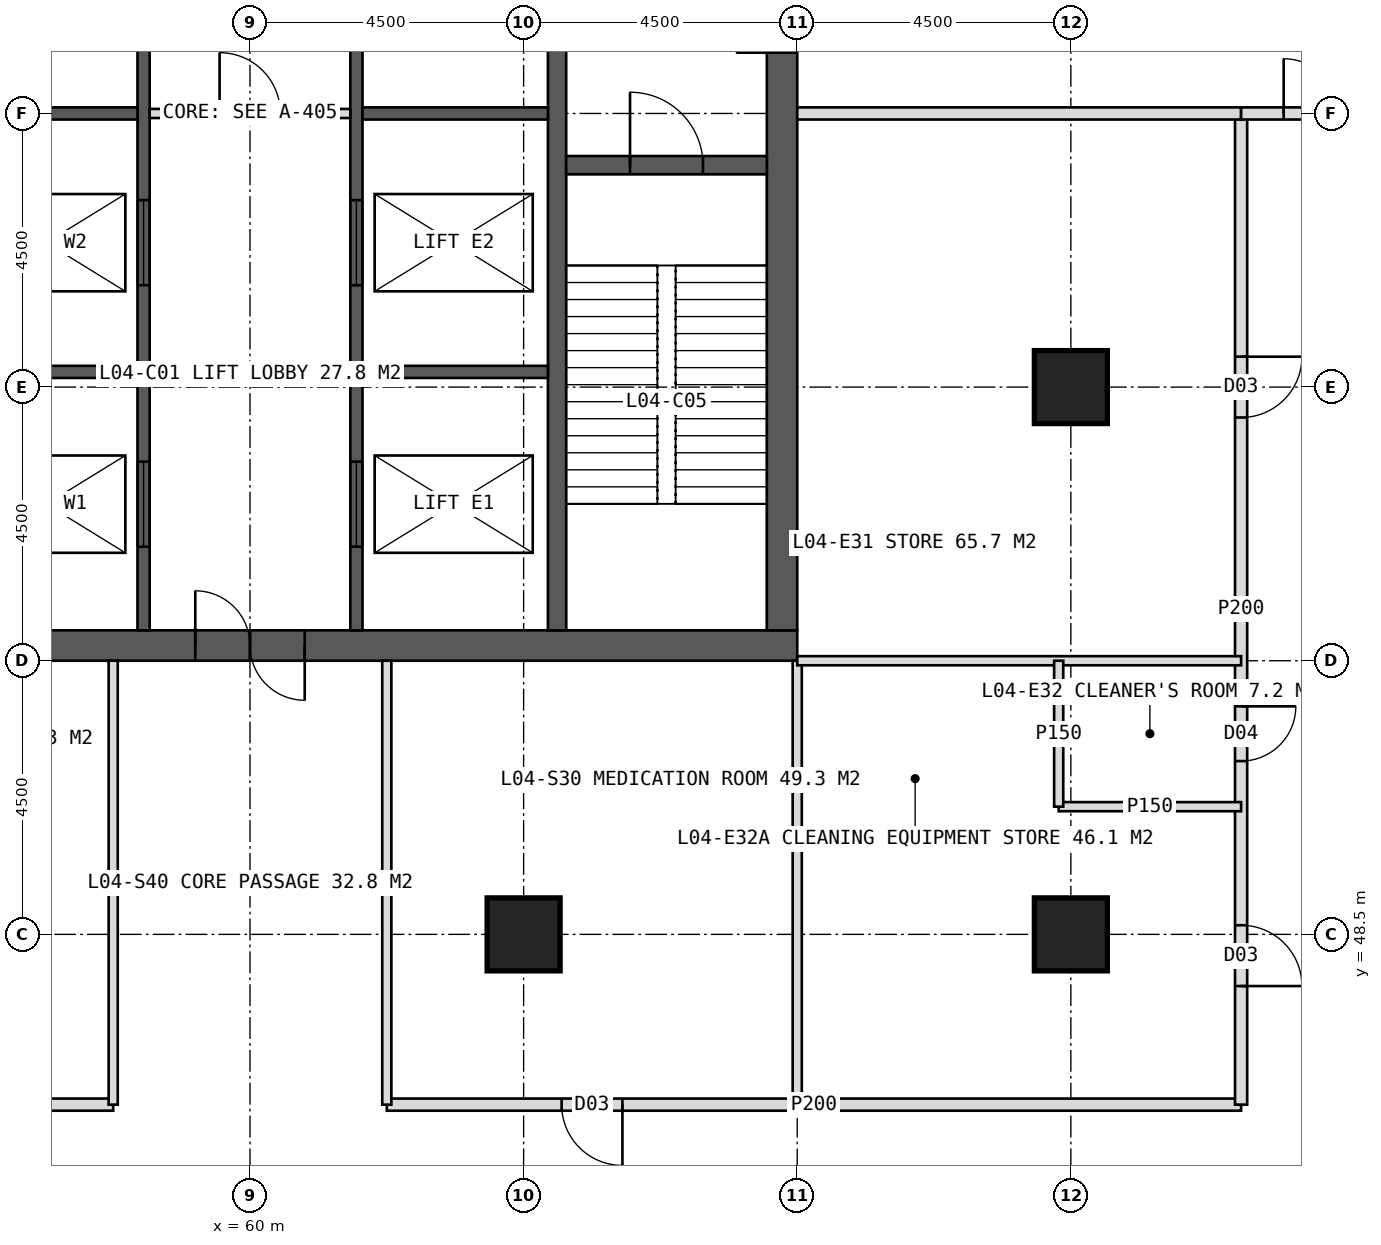
"""IFC4 building model, lengths in metres.
Left out: names, types, materials, properties, quantities, classifications, styles, units other than length and angle.
Written with IfcOpenShell. Run it as: python <this file> out.ifc"""

import sys

from ifc_helpers import new_model, si_unit, direction, frame, frame_2d, origin, origin_2d, place, context, subcontext, project, spatial, rectangle, hollow_rectangle, extrude, element, fill, save


model = new_model("IFC4")
c1 = context("Model", 3, precision=1e-05, world=origin(), true_north=direction((0.0, 1.0)))
c2 = subcontext(c1, "Body", "Model", "MODEL_VIEW")
j1 = project(units=[si_unit("LENGTHUNIT", "METRE"), si_unit("PLANEANGLEUNIT", "RADIAN")], contexts=[c1])
p1 = place(None, origin())
s1 = spatial("IfcSite", under=j1, at=p1, CompositionType="ELEMENT")
p2 = place(p1, origin())
s2 = spatial("IfcBuilding", under=s1, at=p2, CompositionType="ELEMENT")
p3 = place(p2, frame((0.0, 0.0, 21.0)))
s3 = spatial("IfcBuildingStorey", under=s2, at=p3, CompositionType="ELEMENT", Elevation=21.0)
p4 = place(p3, frame((51.0, 53.25, 0.0), z_axis=(0.0, 0.0, 1.0), x_axis=(1.0, 0.0, 0.0)))
e1 = element("IfcWall", 1, at=p4, inside=s3, PredefinedType="SHEAR", context=c2, shape_type="SweptSolid", body=[
    extrude(rectangle(XDim=18.0, YDim=0.5, at=frame_2d((9.0, 0.0))), origin(), (0.0, 0.0, 1.0), 5.0),
])
p5 = place(p4, frame((8.1, 0.0, 0.0)))
e2 = element("IfcOpeningElement", 2, at=p5, cuts=e1, PredefinedType="OPENING", context=c2, shape_type="SweptSolid", body=[
    extrude(rectangle(XDim=1.8, YDim=2.2, at=frame_2d((0.9, 1.1))), frame((0.0, 0.26, 0.0), z_axis=(0.0, -1.0, 0.0), x_axis=(1.0, 0.0, 0.0)), (0.0, 0.0, 1.0), 0.52),
])
p6 = place(p3, frame((68.75, 53.5, 0.0), z_axis=(0.0, 0.0, 1.0), x_axis=(0.0, 1.0, 0.0)))
e3 = element("IfcWall", 3, at=p6, inside=s3, PredefinedType="SHEAR", context=c2, shape_type="SweptSolid", body=[
    extrude(rectangle(XDim=17.0, YDim=0.5, at=frame_2d((8.5, 0.0))), origin(), (0.0, 0.0, 1.0), 5.0),
])
p7 = place(p6, frame((9.5, 0.0, 0.0)))
e4 = element("IfcOpeningElement", 4, at=p7, cuts=e3, PredefinedType="OPENING", context=c2, shape_type="SweptSolid", body=[
    extrude(rectangle(XDim=1.5, YDim=2.2, at=frame_2d((0.75, 1.1))), frame((0.0, 0.26, 0.0), z_axis=(0.0, -1.0, 0.0), x_axis=(1.0, 0.0, 0.0)), (0.0, 0.0, 1.0), 0.52),
])
p8 = place(p3, frame((65.05, 53.5, 0.0), z_axis=(0.0, 0.0, 1.0), x_axis=(0.0, 1.0, 0.0)))
e5 = element("IfcWall", 5, at=p8, inside=s3, PredefinedType="SHEAR", context=c2, shape_type="SweptSolid", body=[
    extrude(rectangle(XDim=17.0, YDim=0.3, at=frame_2d((8.5, 0.0))), origin(), (0.0, 0.0, 1.0), 5.0),
])
p9 = place(p3, frame((58.25, 53.5, 0.0), z_axis=(0.0, 0.0, 1.0), x_axis=(0.0, 1.0, 0.0)))
e6 = element("IfcWall", 6, at=p9, inside=s3, PredefinedType="SHEAR", context=c2, shape_type="SweptSolid", body=[
    extrude(rectangle(XDim=17.0, YDim=0.2, at=frame_2d((8.5, 0.0))), origin(), (0.0, 0.0, 1.0), 5.0),
])
p10 = place(p9, frame((1.375, 0.0, 0.0)))
e7 = element("IfcOpeningElement", 7, at=p10, cuts=e6, PredefinedType="OPENING", context=c2, shape_type="SweptSolid", body=[
    extrude(rectangle(XDim=1.4, YDim=2.2, at=frame_2d((0.7, 1.1))), frame((0.0, 0.11, 0.0), z_axis=(0.0, -1.0, 0.0), x_axis=(1.0, 0.0, 0.0)), (0.0, 0.0, 1.0), 0.22),
])
p11 = place(p9, frame((5.675, 0.0, 0.0)))
e8 = element("IfcOpeningElement", 8, at=p11, cuts=e6, PredefinedType="OPENING", context=c2, shape_type="SweptSolid", body=[
    extrude(rectangle(XDim=1.4, YDim=2.2, at=frame_2d((0.7, 1.1))), frame((0.0, 0.11, 0.0), z_axis=(0.0, -1.0, 0.0), x_axis=(1.0, 0.0, 0.0)), (0.0, 0.0, 1.0), 0.22),
])
p12 = place(p3, frame((61.75, 53.5, 0.0), z_axis=(0.0, 0.0, 1.0), x_axis=(0.0, 1.0, 0.0)))
e9 = element("IfcWall", 9, at=p12, inside=s3, PredefinedType="SHEAR", context=c2, shape_type="SweptSolid", body=[
    extrude(rectangle(XDim=17.0, YDim=0.2, at=frame_2d((8.5, 0.0))), origin(), (0.0, 0.0, 1.0), 5.0),
])
p13 = place(p12, frame((1.375, 0.0, 0.0)))
e10 = element("IfcOpeningElement", 10, at=p13, cuts=e9, PredefinedType="OPENING", context=c2, shape_type="SweptSolid", body=[
    extrude(rectangle(XDim=1.4, YDim=2.2, at=frame_2d((0.7, 1.1))), frame((0.0, 0.11, 0.0), z_axis=(0.0, -1.0, 0.0), x_axis=(1.0, 0.0, 0.0)), (0.0, 0.0, 1.0), 0.22),
])
p14 = place(p12, frame((5.675, 0.0, 0.0)))
e11 = element("IfcOpeningElement", 11, at=p14, cuts=e9, PredefinedType="OPENING", context=c2, shape_type="SweptSolid", body=[
    extrude(rectangle(XDim=1.4, YDim=2.2, at=frame_2d((0.7, 1.1))), frame((0.0, 0.11, 0.0), z_axis=(0.0, -1.0, 0.0), x_axis=(1.0, 0.0, 0.0)), (0.0, 0.0, 1.0), 0.22),
])
for number, where, z_axis, x_axis in (
    (12, (55.1, 57.75, 0.0), (0.0, 0.0, 1.0), (1.0, 0.0, 0.0)),
    (13, (61.85, 57.75, 0.0), (0.0, 0.0, 1.0), (1.0, 0.0, 0.0)),
    (14, (55.1, 62.0, 0.0), (0.0, 0.0, 1.0), (1.0, 0.0, 0.0)),
    (15, (61.85, 62.0, 0.0), (0.0, 0.0, 1.0), (1.0, 0.0, 0.0)),
):
    element("IfcWall", number, at=place(p3, frame(where, z_axis=z_axis, x_axis=x_axis)), inside=s3, PredefinedType="SHEAR", context=c2, shape_type="SweptSolid", body=[
        extrude(rectangle(XDim=3.05, YDim=0.2, at=frame_2d((1.525, 0.0))), origin(), (0.0, 0.0, 1.0), 5.0),
    ])
p15 = place(p3, frame((65.2, 61.15, 0.0), z_axis=(0.0, 0.0, 1.0), x_axis=(1.0, 0.0, 0.0)))
e16 = element("IfcWall", 16, at=p15, inside=s3, PredefinedType="SHEAR", context=c2, shape_type="SweptSolid", body=[
    extrude(rectangle(XDim=3.3, YDim=0.3, at=frame_2d((1.65, 0.0))), origin(), (0.0, 0.0, 1.0), 5.0),
])
p16 = place(p15, frame((1.05, 0.0, 0.0)))
e17 = element("IfcOpeningElement", 17, at=p16, cuts=e16, PredefinedType="OPENING", context=c2, shape_type="SweptSolid", body=[
    extrude(rectangle(XDim=1.2, YDim=2.1, at=frame_2d((0.6, 1.05))), frame((0.0, 0.16, 0.0), z_axis=(0.0, -1.0, 0.0), x_axis=(1.0, 0.0, 0.0)), (0.0, 0.0, 1.0), 0.32),
])
for number, where, z_axis, x_axis in (
    (18, (73.5, 48.5, 0.0), (0.0, 0.0, 1.0), (1.0, 0.0, 0.0)),
    (19, (64.5, 48.5, 0.0), (0.0, 0.0, 1.0), (1.0, 0.0, 0.0)),
    (20, (73.5, 57.5, 0.0), (0.0, 0.0, 1.0), (1.0, 0.0, 0.0)),
):
    element("IfcColumn", number, at=place(p3, frame(where, z_axis=z_axis, x_axis=x_axis)), inside=s3, PredefinedType="COLUMN", context=c2, shape_type="SweptSolid", body=[
        extrude(hollow_rectangle(XDim=1.2, YDim=1.2, WallThickness=0.1, at=origin_2d()), origin(), (0.0, 0.0, 1.0), 5.0),
    ])
p17 = place(p3, frame((76.3, 45.7, 0.0), z_axis=(0.0, 0.0, 1.0), x_axis=(-1.0, 0.0, 0.0)))
e21 = element("IfcWall", 21, at=p17, inside=s3, PredefinedType="PARTITIONING", context=c2, shape_type="SweptSolid", body=[
    extrude(rectangle(XDim=14.05, YDim=0.2, at=frame_2d((7.025, 0.0))), origin(), (0.0, 0.0, 1.0), 4.7),
])
p18 = place(p17, frame((10.175, 0.0, 0.0)))
e22 = element("IfcOpeningElement", 22, at=p18, cuts=e21, PredefinedType="OPENING", context=c2, shape_type="SweptSolid", body=[
    extrude(rectangle(XDim=1.0, YDim=2.1, at=frame_2d((0.5, 1.05))), frame((0.0, 0.11, 0.0), z_axis=(0.0, -1.0, 0.0), x_axis=(1.0, 0.0, 0.0)), (0.0, 0.0, 1.0), 0.22),
])
p19 = place(p3, frame((57.75, 45.7, 0.0), z_axis=(0.0, 0.0, 1.0), x_axis=(-1.0, 0.0, 0.0)))
e23 = element("IfcWall", 23, at=p19, inside=s3, PredefinedType="PARTITIONING", context=c2, shape_type="SweptSolid", body=[
    extrude(rectangle(XDim=14.05, YDim=0.2, at=frame_2d((7.025, 0.0))), origin(), (0.0, 0.0, 1.0), 4.7),
])
p20 = place(p19, frame((9.9, 0.0, 0.0)))
e24 = element("IfcOpeningElement", 24, at=p20, cuts=e23, PredefinedType="OPENING", context=c2, shape_type="SweptSolid", body=[
    extrude(rectangle(XDim=1.0, YDim=2.1, at=frame_2d((0.5, 1.05))), frame((0.0, 0.11, 0.0), z_axis=(0.0, -1.0, 0.0), x_axis=(1.0, 0.0, 0.0)), (0.0, 0.0, 1.0), 0.22),
])
p21 = place(p19, frame((4.9, 0.0, 0.0)))
e25 = element("IfcOpeningElement", 25, at=p21, cuts=e23, PredefinedType="OPENING", context=c2, shape_type="SweptSolid", body=[
    extrude(rectangle(XDim=0.9, YDim=2.1, at=frame_2d((0.45, 1.05))), frame((0.0, 0.11, 0.0), z_axis=(0.0, -1.0, 0.0), x_axis=(1.0, 0.0, 0.0)), (0.0, 0.0, 1.0), 0.22),
])
p22 = place(p19, frame((1.475, 0.0, 0.0)))
e26 = element("IfcOpeningElement", 26, at=p22, cuts=e23, PredefinedType="OPENING", context=c2, shape_type="SweptSolid", body=[
    extrude(rectangle(XDim=1.0, YDim=2.1, at=frame_2d((0.5, 1.05))), frame((0.0, 0.11, 0.0), z_axis=(0.0, -1.0, 0.0), x_axis=(1.0, 0.0, 0.0)), (0.0, 0.0, 1.0), 0.22),
])
for number, where, z_axis, x_axis in (
    (27, (69.0, 53.0, 0.0), (0.0, 0.0, 1.0), (0.0, -1.0, 0.0)),
    (28, (62.25, 53.0, 0.0), (0.0, 0.0, 1.0), (0.0, -1.0, 0.0)),
    (29, (57.75, 53.0, 0.0), (0.0, 0.0, 1.0), (0.0, -1.0, 0.0)),
):
    element("IfcWall", number, at=place(p3, frame(where, z_axis=z_axis, x_axis=x_axis)), inside=s3, PredefinedType="PARTITIONING", context=c2, shape_type="SweptSolid", body=[
        extrude(rectangle(XDim=7.3, YDim=0.15, at=frame_2d((3.65, 0.0))), origin(), (0.0, 0.0, 1.0), 4.7),
    ])
p23 = place(p3, frame((76.3, 62.0, 0.0), z_axis=(0.0, 0.0, 1.0), x_axis=(0.0, -1.0, 0.0)))
e30 = element("IfcWall", 30, at=p23, inside=s3, PredefinedType="PARTITIONING", context=c2, shape_type="SweptSolid", body=[
    extrude(rectangle(XDim=16.3, YDim=0.2, at=frame_2d((8.15, 0.0))), origin(), (0.0, 0.0, 1.0), 4.7),
])
p24 = place(p23, frame((4.0, 0.0, 0.0)))
e31 = element("IfcOpeningElement", 31, at=p24, cuts=e30, PredefinedType="OPENING", context=c2, shape_type="SweptSolid", body=[
    extrude(rectangle(XDim=1.0, YDim=2.1, at=frame_2d((0.5, 1.05))), frame((0.0, 0.11, 0.0), z_axis=(0.0, -1.0, 0.0), x_axis=(1.0, 0.0, 0.0)), (0.0, 0.0, 1.0), 0.22),
])
p25 = place(p23, frame((9.75, 0.0, 0.0)))
e32 = element("IfcOpeningElement", 32, at=p25, cuts=e30, PredefinedType="OPENING", context=c2, shape_type="SweptSolid", body=[
    extrude(rectangle(XDim=0.9, YDim=2.1, at=frame_2d((0.45, 1.05))), frame((0.0, 0.11, 0.0), z_axis=(0.0, -1.0, 0.0), x_axis=(1.0, 0.0, 0.0)), (0.0, 0.0, 1.0), 0.22),
])
p26 = place(p23, frame((13.35, 0.0, 0.0)))
e33 = element("IfcOpeningElement", 33, at=p26, cuts=e30, PredefinedType="OPENING", context=c2, shape_type="SweptSolid", body=[
    extrude(rectangle(XDim=1.0, YDim=2.1, at=frame_2d((0.5, 1.05))), frame((0.0, 0.11, 0.0), z_axis=(0.0, -1.0, 0.0), x_axis=(1.0, 0.0, 0.0)), (0.0, 0.0, 1.0), 0.22),
])
p27 = place(p3, frame((69.0, 62.0, 0.0), z_axis=(0.0, 0.0, 1.0), x_axis=(1.0, 0.0, 0.0)))
e34 = element("IfcWall", 34, at=p27, inside=s3, PredefinedType="SOLIDWALL", context=c2, shape_type="SweptSolid", body=[
    extrude(rectangle(XDim=7.3, YDim=0.2, at=frame_2d((3.65, 0.0))), origin(), (0.0, 0.0, 1.0), 3.7),
])
p28 = place(p3, frame((69.0, 53.0, 0.0), z_axis=(0.0, 0.0, 1.0), x_axis=(1.0, 0.0, 0.0)))
e35 = element("IfcWall", 35, at=p28, inside=s3, PredefinedType="PARTITIONING", context=c2, shape_type="SweptSolid", body=[
    extrude(rectangle(XDim=7.3, YDim=0.15, at=frame_2d((3.65, 0.0))), origin(), (0.0, 0.0, 1.0), 4.7),
])
p29 = place(p3, frame((73.3, 50.6, 0.0), z_axis=(0.0, 0.0, 1.0), x_axis=(1.0, 0.0, 0.0)))
e36 = element("IfcWall", 36, at=p29, inside=s3, PredefinedType="PARTITIONING", context=c2, shape_type="SweptSolid", body=[
    extrude(rectangle(XDim=3.0, YDim=0.15, at=frame_2d((1.5, 0.0))), origin(), (0.0, 0.0, 1.0), 4.7),
])
p30 = place(p3, frame((73.3, 53.0, 0.0), z_axis=(0.0, 0.0, 1.0), x_axis=(0.0, -1.0, 0.0)))
e37 = element("IfcWall", 37, at=p30, inside=s3, PredefinedType="PARTITIONING", context=c2, shape_type="SweptSolid", body=[
    extrude(rectangle(XDim=2.4, YDim=0.15, at=frame_2d((1.2, 0.0))), origin(), (0.0, 0.0, 1.0), 4.7),
])
p31 = place(p3, frame((76.3, 62.0, 0.0), z_axis=(0.0, 0.0, 1.0), x_axis=(1.0, 0.0, 0.0)))
e38 = element("IfcWall", 38, at=p31, inside=s3, PredefinedType="SOLIDWALL", context=c2, shape_type="SweptSolid", body=[
    extrude(rectangle(XDim=3.2, YDim=0.2, at=frame_2d((1.6, 0.0))), origin(), (0.0, 0.0, 1.0), 3.7),
])
p32 = place(p31, frame((0.7, 0.0, 0.0)))
e39 = element("IfcOpeningElement", 39, at=p32, cuts=e38, PredefinedType="OPENING", context=c2, shape_type="SweptSolid", body=[
    extrude(rectangle(XDim=1.8, YDim=2.2, at=frame_2d((0.9, 1.1))), frame((0.0, 0.11, 0.0), z_axis=(0.0, -1.0, 0.0), x_axis=(1.0, 0.0, 0.0)), (0.0, 0.0, 1.0), 0.22),
])
p33 = place(p3, frame((58.35, 62.0, 0.0), z_axis=(0.0, 0.0, 1.0), x_axis=(1.0, 0.0, 0.0)))
e40 = element("IfcWall", 40, at=p33, inside=s3, PredefinedType="PARTITIONING", context=c2, shape_type="SweptSolid", body=[
    extrude(rectangle(XDim=3.3, YDim=0.15, at=frame_2d((1.65, 0.0))), origin(), (0.0, 0.0, 1.0), 4.7),
])
p34 = place(p33, frame((1.15, 0.0, 0.0)))
e41 = element("IfcOpeningElement", 41, at=p34, cuts=e40, PredefinedType="OPENING", context=c2, shape_type="SweptSolid", body=[
    extrude(rectangle(XDim=1.0, YDim=2.1, at=frame_2d((0.5, 1.05))), frame((0.0, 0.085, 0.0), z_axis=(0.0, -1.0, 0.0), x_axis=(1.0, 0.0, 0.0)), (0.0, 0.0, 1.0), 0.17),
])
p35 = place(p18, origin())
e42 = element("IfcDoor", 42, at=p35, inside=s3, OperationType="SINGLE_SWING_LEFT", PredefinedType="DOOR", context=c2, shape_type="SweptSolid", body=[
    extrude(rectangle(XDim=1.0, YDim=2.1, at=frame_2d((0.5, 1.05))), frame((0.0, 0.025, 0.0), z_axis=(0.0, -1.0, 0.0), x_axis=(1.0, 0.0, 0.0)), (0.0, 0.0, 1.0), 0.05),
])
fill(e22, e42)
p36 = place(p24, origin())
e43 = element("IfcDoor", 43, at=p36, inside=s3, OperationType="SINGLE_SWING_LEFT", PredefinedType="DOOR", context=c2, shape_type="SweptSolid", body=[
    extrude(rectangle(XDim=1.0, YDim=2.1, at=frame_2d((0.5, 1.05))), frame((0.0, 0.025, 0.0), z_axis=(0.0, -1.0, 0.0), x_axis=(1.0, 0.0, 0.0)), (0.0, 0.0, 1.0), 0.05),
])
fill(e31, e43)
p37 = place(p32, origin())
e44 = element("IfcDoor", 44, at=p37, inside=s3, OperationType="DOUBLE_DOOR_DOUBLE_SWING", PredefinedType="DOOR", context=c2, shape_type="SweptSolid", body=[
    extrude(rectangle(XDim=1.8, YDim=2.2, at=frame_2d((0.9, 1.1))), frame((0.0, 0.025, 0.0), z_axis=(0.0, -1.0, 0.0), x_axis=(1.0, 0.0, 0.0)), (0.0, 0.0, 1.0), 0.05),
])
fill(e39, e44)
p38 = place(p5, origin())
e45 = element("IfcDoor", 45, at=p38, inside=s3, OperationType="DOUBLE_DOOR_SINGLE_SWING", PredefinedType="DOOR", context=c2, shape_type="SweptSolid", body=[
    extrude(rectangle(XDim=1.8, YDim=2.2, at=frame_2d((0.9, 1.1))), frame((0.0, 0.025, 0.0), z_axis=(0.0, -1.0, 0.0), x_axis=(1.0, 0.0, 0.0)), (0.0, 0.0, 1.0), 0.05),
])
fill(e2, e45)
p39 = place(p16, origin())
e46 = element("IfcDoor", 46, at=p39, inside=s3, OperationType="SINGLE_SWING_LEFT", PredefinedType="DOOR", context=c2, shape_type="SweptSolid", body=[
    extrude(rectangle(XDim=1.2, YDim=2.1, at=frame_2d((0.6, 1.05))), frame((0.0, 0.025, 0.0), z_axis=(0.0, -1.0, 0.0), x_axis=(1.0, 0.0, 0.0)), (0.0, 0.0, 1.0), 0.05),
])
fill(e17, e46)
p40 = place(p10, origin())
e47 = element("IfcDoor", 47, at=p40, inside=s3, OperationType="SLIDING_TO_LEFT", PredefinedType="DOOR", context=c2, shape_type="SweptSolid", body=[
    extrude(rectangle(XDim=1.4, YDim=2.2, at=frame_2d((0.7, 1.1))), frame((0.0, 0.025, 0.0), z_axis=(0.0, -1.0, 0.0), x_axis=(1.0, 0.0, 0.0)), (0.0, 0.0, 1.0), 0.05),
])
fill(e7, e47)
p41 = place(p13, origin())
e48 = element("IfcDoor", 48, at=p41, inside=s3, OperationType="SLIDING_TO_LEFT", PredefinedType="DOOR", context=c2, shape_type="SweptSolid", body=[
    extrude(rectangle(XDim=1.4, YDim=2.2, at=frame_2d((0.7, 1.1))), frame((0.0, 0.025, 0.0), z_axis=(0.0, -1.0, 0.0), x_axis=(1.0, 0.0, 0.0)), (0.0, 0.0, 1.0), 0.05),
])
fill(e10, e48)
p42 = place(p11, origin())
e49 = element("IfcDoor", 49, at=p42, inside=s3, OperationType="SLIDING_TO_LEFT", PredefinedType="DOOR", context=c2, shape_type="SweptSolid", body=[
    extrude(rectangle(XDim=1.4, YDim=2.2, at=frame_2d((0.7, 1.1))), frame((0.0, 0.025, 0.0), z_axis=(0.0, -1.0, 0.0), x_axis=(1.0, 0.0, 0.0)), (0.0, 0.0, 1.0), 0.05),
])
fill(e8, e49)
p43 = place(p14, origin())
e50 = element("IfcDoor", 50, at=p43, inside=s3, OperationType="SLIDING_TO_LEFT", PredefinedType="DOOR", context=c2, shape_type="SweptSolid", body=[
    extrude(rectangle(XDim=1.4, YDim=2.2, at=frame_2d((0.7, 1.1))), frame((0.0, 0.025, 0.0), z_axis=(0.0, -1.0, 0.0), x_axis=(1.0, 0.0, 0.0)), (0.0, 0.0, 1.0), 0.05),
])
fill(e11, e50)
p44 = place(p34, origin())
e51 = element("IfcDoor", 51, at=p44, inside=s3, OperationType="SINGLE_SWING_LEFT", PredefinedType="DOOR", context=c2, shape_type="SweptSolid", body=[
    extrude(rectangle(XDim=1.0, YDim=2.1, at=frame_2d((0.5, 1.05))), frame((0.0, 0.025, 0.0), z_axis=(0.0, -1.0, 0.0), x_axis=(1.0, 0.0, 0.0)), (0.0, 0.0, 1.0), 0.05),
])
fill(e41, e51)
p45 = place(p25, origin())
e52 = element("IfcDoor", 52, at=p45, inside=s3, OperationType="SINGLE_SWING_LEFT", PredefinedType="DOOR", context=c2, shape_type="SweptSolid", body=[
    extrude(rectangle(XDim=0.9, YDim=2.1, at=frame_2d((0.45, 1.05))), frame((0.0, 0.025, 0.0), z_axis=(0.0, -1.0, 0.0), x_axis=(1.0, 0.0, 0.0)), (0.0, 0.0, 1.0), 0.05),
])
fill(e32, e52)
p46 = place(p26, origin())
e53 = element("IfcDoor", 53, at=p46, inside=s3, OperationType="SINGLE_SWING_RIGHT", PredefinedType="DOOR", context=c2, shape_type="SweptSolid", body=[
    extrude(rectangle(XDim=1.0, YDim=2.1, at=frame_2d((0.5, 1.05))), frame((0.0, 0.025, 0.0), z_axis=(0.0, -1.0, 0.0), x_axis=(1.0, 0.0, 0.0)), (0.0, 0.0, 1.0), 0.05),
])
fill(e33, e53)
save(model, sys.argv[1])
